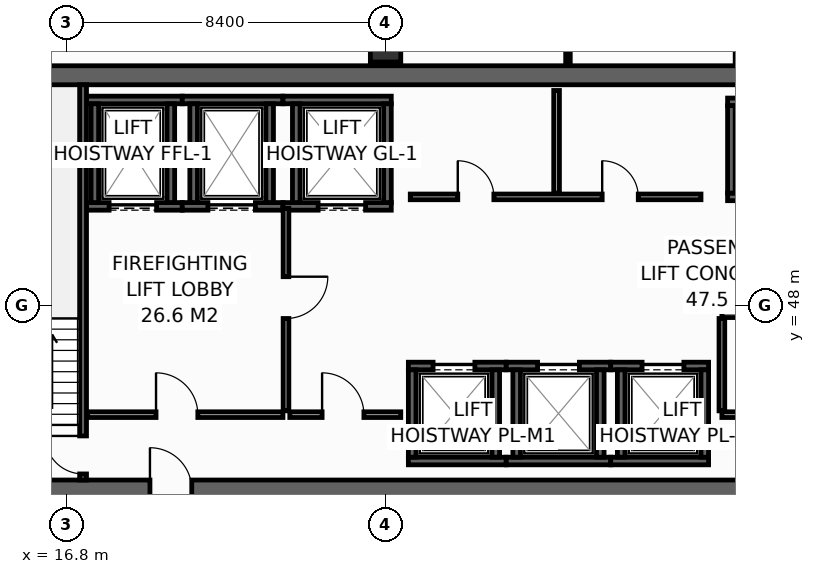
"""IFC4 building model, lengths in metres.
Left out: names, types, materials, properties, quantities, classifications, styles, units other than length and angle.
Written with IfcOpenShell. Run it as: python <this file> out.ifc"""

import sys

from ifc_helpers import new_model, si_unit, direction, frame, frame_2d, origin, origin_2d, place, context, subcontext, project, spatial, rectangle, hollow_rectangle, extrude, element, fill, save


model = new_model("IFC4")
c1 = context("Model", 3, precision=1e-05, world=origin(), true_north=direction((0.0, 1.0)))
c2 = subcontext(c1, "Body", "Model", "MODEL_VIEW")
j1 = project(units=[si_unit("LENGTHUNIT", "METRE"), si_unit("PLANEANGLEUNIT", "RADIAN")], contexts=[c1])
p1 = place(None, origin())
s1 = spatial("IfcSite", under=j1, at=p1, CompositionType="ELEMENT")
p2 = place(p1, origin())
s2 = spatial("IfcBuilding", under=s1, at=p2, CompositionType="ELEMENT")
p3 = place(p2, frame((0.0, 0.0, 182.8)))
s3 = spatial("IfcBuildingStorey", under=s2, at=p3, CompositionType="ELEMENT", Elevation=182.8)
p4 = place(p3, frame((13.6, 43.15, 0.0), z_axis=(0.0, 0.0, 1.0), x_axis=(1.0, 0.0, 0.0)))
e1 = element("IfcWall", 1, at=p4, inside=s3, PredefinedType="SHEAR", context=c2, shape_type="SweptSolid", body=[
    extrude(rectangle(XDim=32.7, YDim=0.5, at=frame_2d((16.35, 0.0))), origin(), (0.0, 0.0, 1.0), 3.55),
])
p5 = place(p4, frame((5.4, 0.0, 0.0)))
e2 = element("IfcOpeningElement", 2, at=p5, cuts=e1, PredefinedType="OPENING", context=c2, shape_type="SweptSolid", body=[
    extrude(rectangle(XDim=1.1, YDim=2.15, at=frame_2d((0.55, 1.075))), frame((0.0, 0.26, 0.0), z_axis=(0.0, -1.0, 0.0), x_axis=(1.0, 0.0, 0.0)), (0.0, 0.0, 1.0), 0.52),
])
p6 = place(p4, frame((25.6, 0.0, 0.0)))
e3 = element("IfcOpeningElement", 3, at=p6, cuts=e1, PredefinedType="OPENING", context=c2, shape_type="SweptSolid", body=[
    extrude(rectangle(XDim=1.1, YDim=2.15, at=frame_2d((0.55, 1.075))), frame((0.0, 0.26, 0.0), z_axis=(0.0, -1.0, 0.0), x_axis=(1.0, 0.0, 0.0)), (0.0, 0.0, 1.0), 0.52),
])
p7 = place(p3, frame((13.6, 54.05, 0.0), z_axis=(0.0, 0.0, 1.0), x_axis=(1.0, 0.0, 0.0)))
e4 = element("IfcWall", 4, at=p7, inside=s3, PredefinedType="SHEAR", context=c2, shape_type="SweptSolid", body=[
    extrude(rectangle(XDim=32.7, YDim=0.5, at=frame_2d((16.35, 0.0))), origin(), (0.0, 0.0, 1.0), 3.55),
])
p8 = place(p3, frame((25.2, 54.8, 0.0), z_axis=(0.0, 0.0, 1.0), x_axis=(1.0, 0.0, 0.0)))
e5 = element("IfcColumn", 5, at=p8, inside=s3, PredefinedType="COLUMN", context=c2, shape_type="SweptSolid", body=[
    extrude(hollow_rectangle(XDim=0.8, YDim=0.8, WallThickness=0.036, at=origin_2d()), origin(), (0.0, 0.0, 1.0), 3.8),
])
p9 = place(p3, frame((17.33, 50.6, 0.0), z_axis=(0.0, 0.0, 1.0), x_axis=(1.0, 0.0, 0.0)))
e6 = element("IfcWall", 6, at=p9, inside=s3, PredefinedType="SHEAR", context=c2, shape_type="SweptSolid", body=[
    extrude(rectangle(XDim=2.52, YDim=0.2, at=frame_2d((1.26, 0.0))), origin(), (0.0, 0.0, 1.0), 3.55),
])
p10 = place(p9, frame((0.595, 0.0, 0.0)))
e7 = element("IfcOpeningElement", 7, at=p10, cuts=e6, PredefinedType="OPENING", context=c2, shape_type="SweptSolid", body=[
    extrude(rectangle(XDim=1.25, YDim=2.3, at=frame_2d((0.625, 1.15))), frame((0.0, 0.11, 0.0), z_axis=(0.0, -1.0, 0.0), x_axis=(1.0, 0.0, 0.0)), (0.0, 0.0, 1.0), 0.22),
])
p11 = place(p3, frame((17.33, 53.4, 0.0), z_axis=(0.0, 0.0, 1.0), x_axis=(1.0, 0.0, 0.0)))
e8 = element("IfcWall", 8, at=p11, inside=s3, PredefinedType="SHEAR", context=c2, shape_type="SweptSolid", body=[
    extrude(rectangle(XDim=2.52, YDim=0.2, at=frame_2d((1.26, 0.0))), origin(), (0.0, 0.0, 1.0), 3.55),
])
for number, where, z_axis, x_axis in (
    (9, (17.55, 50.7, 0.0), (0.0, 0.0, 1.0), (0.0, 1.0, 0.0)),
    (10, (19.55, 50.7, 0.0), (0.0, 0.0, 1.0), (0.0, 1.0, 0.0)),
):
    element("IfcWall", number, at=place(p3, frame(where, z_axis=z_axis, x_axis=x_axis)), inside=s3, PredefinedType="SHEAR", context=c2, shape_type="SweptSolid", body=[
        extrude(rectangle(XDim=2.6, YDim=0.2, at=frame_2d((1.3, 0.0))), origin(), (0.0, 0.0, 1.0), 3.55),
    ])
p12 = place(p3, frame((19.85, 50.6, 0.0), z_axis=(0.0, 0.0, 1.0), x_axis=(1.0, 0.0, 0.0)))
e11 = element("IfcWall", 11, at=p12, inside=s3, PredefinedType="SHEAR", context=c2, shape_type="SweptSolid", body=[
    extrude(rectangle(XDim=2.65, YDim=0.2, at=frame_2d((1.325, 0.0))), origin(), (0.0, 0.0, 1.0), 3.55),
])
p13 = place(p12, frame((0.675, 0.0, 0.0)))
e12 = element("IfcOpeningElement", 12, at=p13, cuts=e11, PredefinedType="OPENING", context=c2, shape_type="SweptSolid", body=[
    extrude(rectangle(XDim=1.25, YDim=2.3, at=frame_2d((0.625, 1.15))), frame((0.0, 0.11, 0.0), z_axis=(0.0, -1.0, 0.0), x_axis=(1.0, 0.0, 0.0)), (0.0, 0.0, 1.0), 0.22),
])
p14 = place(p3, frame((19.85, 53.4, 0.0), z_axis=(0.0, 0.0, 1.0), x_axis=(1.0, 0.0, 0.0)))
e13 = element("IfcWall", 13, at=p14, inside=s3, PredefinedType="SHEAR", context=c2, shape_type="SweptSolid", body=[
    extrude(rectangle(XDim=2.65, YDim=0.2, at=frame_2d((1.325, 0.0))), origin(), (0.0, 0.0, 1.0), 3.55),
])
for number, where, z_axis, x_axis in (
    (14, (20.15, 50.7, 0.0), (0.0, 0.0, 1.0), (0.0, 1.0, 0.0)),
    (15, (22.15, 50.7, 0.0), (0.0, 0.0, 1.0), (0.0, 1.0, 0.0)),
):
    element("IfcWall", number, at=place(p3, frame(where, z_axis=z_axis, x_axis=x_axis)), inside=s3, PredefinedType="SHEAR", context=c2, shape_type="SweptSolid", body=[
        extrude(rectangle(XDim=2.6, YDim=0.2, at=frame_2d((1.3, 0.0))), origin(), (0.0, 0.0, 1.0), 3.55),
    ])
p15 = place(p3, frame((22.5, 50.6, 0.0), z_axis=(0.0, 0.0, 1.0), x_axis=(1.0, 0.0, 0.0)))
e16 = element("IfcWall", 16, at=p15, inside=s3, PredefinedType="SHEAR", context=c2, shape_type="SweptSolid", body=[
    extrude(rectangle(XDim=2.85, YDim=0.2, at=frame_2d((1.425, 0.0))), origin(), (0.0, 0.0, 1.0), 3.55),
])
p16 = place(p15, frame((0.925, 0.0, 0.0)))
e17 = element("IfcOpeningElement", 17, at=p16, cuts=e16, PredefinedType="OPENING", context=c2, shape_type="SweptSolid", body=[
    extrude(rectangle(XDim=1.25, YDim=2.3, at=frame_2d((0.625, 1.15))), frame((0.0, 0.11, 0.0), z_axis=(0.0, -1.0, 0.0), x_axis=(1.0, 0.0, 0.0)), (0.0, 0.0, 1.0), 0.22),
])
p17 = place(p3, frame((22.5, 53.4, 0.0), z_axis=(0.0, 0.0, 1.0), x_axis=(1.0, 0.0, 0.0)))
e18 = element("IfcWall", 18, at=p17, inside=s3, PredefinedType="SHEAR", context=c2, shape_type="SweptSolid", body=[
    extrude(rectangle(XDim=2.85, YDim=0.2, at=frame_2d((1.425, 0.0))), origin(), (0.0, 0.0, 1.0), 3.55),
])
for number, where, z_axis, x_axis in (
    (19, (22.85, 50.7, 0.0), (0.0, 0.0, 1.0), (0.0, 1.0, 0.0)),
    (20, (25.25, 50.7, 0.0), (0.0, 0.0, 1.0), (0.0, 1.0, 0.0)),
):
    element("IfcWall", number, at=place(p3, frame(where, z_axis=z_axis, x_axis=x_axis)), inside=s3, PredefinedType="SHEAR", context=c2, shape_type="SweptSolid", body=[
        extrude(rectangle(XDim=2.6, YDim=0.2, at=frame_2d((1.3, 0.0))), origin(), (0.0, 0.0, 1.0), 3.55),
    ])
p18 = place(p3, frame((25.8, 43.9, 0.0), z_axis=(0.0, 0.0, 1.0), x_axis=(1.0, 0.0, 0.0)))
e21 = element("IfcWall", 21, at=p18, inside=s3, PredefinedType="SHEAR", context=c2, shape_type="SweptSolid", body=[
    extrude(rectangle(XDim=2.575, YDim=0.2, at=frame_2d((1.288, 0.0))), origin(), (0.0, 0.0, 1.0), 3.55),
])
p19 = place(p3, frame((25.8, 46.4, 0.0), z_axis=(0.0, 0.0, 1.0), x_axis=(1.0, 0.0, 0.0)))
e22 = element("IfcWall", 22, at=p19, inside=s3, PredefinedType="SHEAR", context=c2, shape_type="SweptSolid", body=[
    extrude(rectangle(XDim=2.575, YDim=0.2, at=frame_2d((1.288, 0.0))), origin(), (0.0, 0.0, 1.0), 3.55),
])
p20 = place(p19, frame((0.65, 0.0, 0.0)))
e23 = element("IfcOpeningElement", 23, at=p20, cuts=e22, PredefinedType="OPENING", context=c2, shape_type="SweptSolid", body=[
    extrude(rectangle(XDim=1.1, YDim=2.2, at=frame_2d((0.55, 1.1))), frame((0.0, 0.11, 0.0), z_axis=(0.0, -1.0, 0.0), x_axis=(1.0, 0.0, 0.0)), (0.0, 0.0, 1.0), 0.22),
])
for number, where, z_axis, x_axis in (
    (24, (25.9, 44.0, 0.0), (0.0, 0.0, 1.0), (0.0, 1.0, 0.0)),
    (25, (28.1, 44.0, 0.0), (0.0, 0.0, 1.0), (0.0, 1.0, 0.0)),
):
    element("IfcWall", number, at=place(p3, frame(where, z_axis=z_axis, x_axis=x_axis)), inside=s3, PredefinedType="SHEAR", context=c2, shape_type="SweptSolid", body=[
        extrude(rectangle(XDim=2.3, YDim=0.2, at=frame_2d((1.15, 0.0))), origin(), (0.0, 0.0, 1.0), 3.55),
    ])
p21 = place(p3, frame((28.375, 43.9, 0.0), z_axis=(0.0, 0.0, 1.0), x_axis=(1.0, 0.0, 0.0)))
e26 = element("IfcWall", 26, at=p21, inside=s3, PredefinedType="SHEAR", context=c2, shape_type="SweptSolid", body=[
    extrude(rectangle(XDim=2.75, YDim=0.2, at=frame_2d((1.375, 0.0))), origin(), (0.0, 0.0, 1.0), 3.55),
])
p22 = place(p3, frame((28.375, 46.4, 0.0), z_axis=(0.0, 0.0, 1.0), x_axis=(1.0, 0.0, 0.0)))
e27 = element("IfcWall", 27, at=p22, inside=s3, PredefinedType="SHEAR", context=c2, shape_type="SweptSolid", body=[
    extrude(rectangle(XDim=2.75, YDim=0.2, at=frame_2d((1.375, 0.0))), origin(), (0.0, 0.0, 1.0), 3.55),
])
p23 = place(p22, frame((0.825, 0.0, 0.0)))
e28 = element("IfcOpeningElement", 28, at=p23, cuts=e27, PredefinedType="OPENING", context=c2, shape_type="SweptSolid", body=[
    extrude(rectangle(XDim=1.1, YDim=2.2, at=frame_2d((0.55, 1.1))), frame((0.0, 0.11, 0.0), z_axis=(0.0, -1.0, 0.0), x_axis=(1.0, 0.0, 0.0)), (0.0, 0.0, 1.0), 0.22),
])
for number, where, z_axis, x_axis in (
    (29, (28.65, 44.0, 0.0), (0.0, 0.0, 1.0), (0.0, 1.0, 0.0)),
    (30, (30.85, 44.0, 0.0), (0.0, 0.0, 1.0), (0.0, 1.0, 0.0)),
):
    element("IfcWall", number, at=place(p3, frame(where, z_axis=z_axis, x_axis=x_axis)), inside=s3, PredefinedType="SHEAR", context=c2, shape_type="SweptSolid", body=[
        extrude(rectangle(XDim=2.3, YDim=0.2, at=frame_2d((1.15, 0.0))), origin(), (0.0, 0.0, 1.0), 3.55),
    ])
p24 = place(p3, frame((31.125, 43.9, 0.0), z_axis=(0.0, 0.0, 1.0), x_axis=(1.0, 0.0, 0.0)))
e31 = element("IfcWall", 31, at=p24, inside=s3, PredefinedType="SHEAR", context=c2, shape_type="SweptSolid", body=[
    extrude(rectangle(XDim=2.575, YDim=0.2, at=frame_2d((1.288, 0.0))), origin(), (0.0, 0.0, 1.0), 3.55),
])
p25 = place(p3, frame((31.125, 46.4, 0.0), z_axis=(0.0, 0.0, 1.0), x_axis=(1.0, 0.0, 0.0)))
e32 = element("IfcWall", 32, at=p25, inside=s3, PredefinedType="SHEAR", context=c2, shape_type="SweptSolid", body=[
    extrude(rectangle(XDim=2.575, YDim=0.2, at=frame_2d((1.288, 0.0))), origin(), (0.0, 0.0, 1.0), 3.55),
])
p26 = place(p25, frame((0.825, 0.0, 0.0)))
e33 = element("IfcOpeningElement", 33, at=p26, cuts=e32, PredefinedType="OPENING", context=c2, shape_type="SweptSolid", body=[
    extrude(rectangle(XDim=1.1, YDim=2.2, at=frame_2d((0.55, 1.1))), frame((0.0, 0.11, 0.0), z_axis=(0.0, -1.0, 0.0), x_axis=(1.0, 0.0, 0.0)), (0.0, 0.0, 1.0), 0.22),
])
for number, where, z_axis, x_axis in (
    (34, (31.4, 44.0, 0.0), (0.0, 0.0, 1.0), (0.0, 1.0, 0.0)),
    (35, (33.6, 44.0, 0.0), (0.0, 0.0, 1.0), (0.0, 1.0, 0.0)),
):
    element("IfcWall", number, at=place(p3, frame(where, z_axis=z_axis, x_axis=x_axis)), inside=s3, PredefinedType="SHEAR", context=c2, shape_type="SweptSolid", body=[
        extrude(rectangle(XDim=2.3, YDim=0.2, at=frame_2d((1.15, 0.0))), origin(), (0.0, 0.0, 1.0), 3.55),
    ])
for number, where, z_axis, x_axis in (
    (36, (34.2, 50.85, 0.0), (0.0, 0.0, 1.0), (1.0, 0.0, 0.0)),
    (37, (34.2, 53.35, 0.0), (0.0, 0.0, 1.0), (1.0, 0.0, 0.0)),
):
    element("IfcWall", number, at=place(p3, frame(where, z_axis=z_axis, x_axis=x_axis)), inside=s3, PredefinedType="SHEAR", context=c2, shape_type="SweptSolid", body=[
        extrude(rectangle(XDim=2.575, YDim=0.2, at=frame_2d((1.288, 0.0))), origin(), (0.0, 0.0, 1.0), 3.55),
    ])
p27 = place(p3, frame((34.3, 50.95, 0.0), z_axis=(0.0, 0.0, 1.0), x_axis=(0.0, 1.0, 0.0)))
e38 = element("IfcWall", 38, at=p27, inside=s3, PredefinedType="SHEAR", context=c2, shape_type="SweptSolid", body=[
    extrude(rectangle(XDim=2.3, YDim=0.2, at=frame_2d((1.15, 0.0))), origin(), (0.0, 0.0, 1.0), 3.55),
])
p28 = place(p3, frame((17.24, 43.4, 0.0), z_axis=(0.0, 0.0, 1.0), x_axis=(0.0, 1.0, 0.0)))
e39 = element("IfcWall", 39, at=p28, inside=s3, PredefinedType="SHEAR", context=c2, shape_type="SweptSolid", body=[
    extrude(rectangle(XDim=10.4, YDim=0.18, at=frame_2d((5.2, 0.0))), origin(), (0.0, 0.0, 1.0), 3.55),
])
p29 = place(p28, frame((0.16, 0.0, 0.0)))
e40 = element("IfcOpeningElement", 40, at=p29, cuts=e39, PredefinedType="OPENING", context=c2, shape_type="SweptSolid", body=[
    extrude(rectangle(XDim=1.0, YDim=2.15, at=frame_2d((0.5, 1.075))), frame((0.0, 0.1, 0.0), z_axis=(0.0, -1.0, 0.0), x_axis=(1.0, 0.0, 0.0)), (0.0, 0.0, 1.0), 0.2),
])
p30 = place(p3, frame((17.36, 45.12, 0.0), z_axis=(0.0, 0.0, 1.0), x_axis=(1.0, 0.0, 0.0)))
e41 = element("IfcWall", 41, at=p30, inside=s3, PredefinedType="PARTITIONING", context=c2, shape_type="SweptSolid", body=[
    extrude(rectangle(XDim=5.14, YDim=0.15, at=frame_2d((2.57, 0.0))), origin(), (0.0, 0.0, 1.0), 3.55),
])
p31 = place(p30, frame((1.8, 0.0, 0.0)))
e42 = element("IfcOpeningElement", 42, at=p31, cuts=e41, PredefinedType="OPENING", context=c2, shape_type="SweptSolid", body=[
    extrude(rectangle(XDim=1.1, YDim=2.15, at=frame_2d((0.55, 1.075))), frame((0.0, 0.085, 0.0), z_axis=(0.0, -1.0, 0.0), x_axis=(1.0, 0.0, 0.0)), (0.0, 0.0, 1.0), 0.17),
])
p32 = place(p3, frame((22.58, 50.55, 0.0), z_axis=(0.0, 0.0, 1.0), x_axis=(0.0, -1.0, 0.0)))
e43 = element("IfcWall", 43, at=p32, inside=s3, PredefinedType="PARTITIONING", context=c2, shape_type="SweptSolid", body=[
    extrude(rectangle(XDim=5.33, YDim=0.15, at=frame_2d((2.665, 0.0))), origin(), (0.0, 0.0, 1.0), 3.55),
])
p33 = place(p32, frame((1.8, 0.0, 0.0)))
e44 = element("IfcOpeningElement", 44, at=p33, cuts=e43, PredefinedType="OPENING", context=c2, shape_type="SweptSolid", body=[
    extrude(rectangle(XDim=1.1, YDim=2.15, at=frame_2d((0.55, 1.075))), frame((0.0, 0.085, 0.0), z_axis=(0.0, -1.0, 0.0), x_axis=(1.0, 0.0, 0.0)), (0.0, 0.0, 1.0), 0.17),
])
p34 = place(p3, frame((22.68, 45.12, 0.0), z_axis=(0.0, 0.0, 1.0), x_axis=(1.0, 0.0, 0.0)))
e45 = element("IfcWall", 45, at=p34, inside=s3, PredefinedType="PARTITIONING", context=c2, shape_type="SweptSolid", body=[
    extrude(rectangle(XDim=2.92, YDim=0.15, at=frame_2d((1.46, 0.0))), origin(), (0.0, 0.0, 1.0), 3.55),
])
p35 = place(p34, frame((0.85, 0.0, 0.0)))
e46 = element("IfcOpeningElement", 46, at=p35, cuts=e45, PredefinedType="OPENING", context=c2, shape_type="SweptSolid", body=[
    extrude(rectangle(XDim=1.1, YDim=2.15, at=frame_2d((0.55, 1.075))), frame((0.0, 0.085, 0.0), z_axis=(0.0, -1.0, 0.0), x_axis=(1.0, 0.0, 0.0)), (0.0, 0.0, 1.0), 0.17),
])
p36 = place(p3, frame((34.05, 45.12, 0.0), z_axis=(0.0, 0.0, 1.0), x_axis=(1.0, 0.0, 0.0)))
e47 = element("IfcWall", 47, at=p36, inside=s3, PredefinedType="PARTITIONING", context=c2, shape_type="SweptSolid", body=[
    extrude(rectangle(XDim=8.45, YDim=0.15, at=frame_2d((4.225, 0.0))), origin(), (0.0, 0.0, 1.0), 3.55),
])
p37 = place(p36, frame((3.6, 0.0, 0.0)))
e48 = element("IfcOpeningElement", 48, at=p37, cuts=e47, PredefinedType="OPENING", context=c2, shape_type="SweptSolid", body=[
    extrude(rectangle(XDim=0.95, YDim=2.15, at=frame_2d((0.475, 1.075))), frame((0.0, 0.085, 0.0), z_axis=(0.0, -1.0, 0.0), x_axis=(1.0, 0.0, 0.0)), (0.0, 0.0, 1.0), 0.17),
])
p38 = place(p3, frame((34.05, 47.75, 0.0), z_axis=(0.0, 0.0, 1.0), x_axis=(1.0, 0.0, 0.0)))
e49 = element("IfcWall", 49, at=p38, inside=s3, PredefinedType="PARTITIONING", context=c2, shape_type="SweptSolid", body=[
    extrude(rectangle(XDim=8.45, YDim=0.15, at=frame_2d((4.225, 0.0))), origin(), (0.0, 0.0, 1.0), 3.55),
])
p39 = place(p3, frame((34.05, 45.22, 0.0), z_axis=(0.0, 0.0, 1.0), x_axis=(0.0, 1.0, 0.0)))
e50 = element("IfcWall", 50, at=p39, inside=s3, PredefinedType="PARTITIONING", context=c2, shape_type="SweptSolid", body=[
    extrude(rectangle(XDim=2.43, YDim=0.15, at=frame_2d((1.215, 0.0))), origin(), (0.0, 0.0, 1.0), 3.55),
])
p40 = place(p3, frame((25.85, 50.85, 0.0), z_axis=(0.0, 0.0, 1.0), x_axis=(1.0, 0.0, 0.0)))
e51 = element("IfcWall", 51, at=p40, inside=s3, PredefinedType="PARTITIONING", context=c2, shape_type="SweptSolid", body=[
    extrude(rectangle(XDim=7.65, YDim=0.15, at=frame_2d((3.825, 0.0))), origin(), (0.0, 0.0, 1.0), 3.55),
])
p41 = place(p40, frame((1.25, 0.0, 0.0)))
e52 = element("IfcOpeningElement", 52, at=p41, cuts=e51, PredefinedType="OPENING", context=c2, shape_type="SweptSolid", body=[
    extrude(rectangle(XDim=0.95, YDim=2.15, at=frame_2d((0.475, 1.075))), frame((0.0, 0.085, 0.0), z_axis=(0.0, -1.0, 0.0), x_axis=(1.0, 0.0, 0.0)), (0.0, 0.0, 1.0), 0.17),
])
p42 = place(p40, frame((5.05, 0.0, 0.0)))
e53 = element("IfcOpeningElement", 53, at=p42, cuts=e51, PredefinedType="OPENING", context=c2, shape_type="SweptSolid", body=[
    extrude(rectangle(XDim=0.95, YDim=2.15, at=frame_2d((0.475, 1.075))), frame((0.0, 0.085, 0.0), z_axis=(0.0, -1.0, 0.0), x_axis=(1.0, 0.0, 0.0)), (0.0, 0.0, 1.0), 0.17),
])
p43 = place(p3, frame((29.7, 50.95, 0.0), z_axis=(0.0, 0.0, 1.0), x_axis=(0.0, 1.0, 0.0)))
e54 = element("IfcWall", 54, at=p43, inside=s3, PredefinedType="PARTITIONING", context=c2, shape_type="SweptSolid", body=[
    extrude(rectangle(XDim=2.7, YDim=0.15, at=frame_2d((1.35, 0.0))), origin(), (0.0, 0.0, 1.0), 3.55),
])
p44 = place(p3, frame((30.0, 54.32, 0.0), z_axis=(0.0, 0.0, 1.0), x_axis=(0.0, 1.0, 0.0)))
e55 = element("IfcWall", 55, at=p44, inside=s3, PredefinedType="PARTITIONING", context=c2, shape_type="SweptSolid", body=[
    extrude(rectangle(XDim=1.675, YDim=0.12, at=frame_2d((0.837, 0.0))), origin(), (0.0, 0.0, 1.0), 2.935),
])
p45 = place(p10, origin())
e56 = element("IfcDoor", 56, at=p45, inside=s3, OperationType="SLIDING_TO_LEFT", PredefinedType="DOOR", context=c2, shape_type="SweptSolid", body=[
    extrude(rectangle(XDim=1.25, YDim=2.3, at=frame_2d((0.625, 1.15))), frame((0.0, 0.025, 0.0), z_axis=(0.0, -1.0, 0.0), x_axis=(1.0, 0.0, 0.0)), (0.0, 0.0, 1.0), 0.05),
])
fill(e7, e56)
p46 = place(p13, origin())
e57 = element("IfcDoor", 57, at=p46, inside=s3, OperationType="SLIDING_TO_LEFT", PredefinedType="DOOR", context=c2, shape_type="SweptSolid", body=[
    extrude(rectangle(XDim=1.25, YDim=2.3, at=frame_2d((0.625, 1.15))), frame((0.0, 0.025, 0.0), z_axis=(0.0, -1.0, 0.0), x_axis=(1.0, 0.0, 0.0)), (0.0, 0.0, 1.0), 0.05),
])
fill(e12, e57)
p47 = place(p16, origin())
e58 = element("IfcDoor", 58, at=p47, inside=s3, OperationType="SLIDING_TO_LEFT", PredefinedType="DOOR", context=c2, shape_type="SweptSolid", body=[
    extrude(rectangle(XDim=1.25, YDim=2.3, at=frame_2d((0.625, 1.15))), frame((0.0, 0.025, 0.0), z_axis=(0.0, -1.0, 0.0), x_axis=(1.0, 0.0, 0.0)), (0.0, 0.0, 1.0), 0.05),
])
fill(e17, e58)
p48 = place(p20, origin())
e59 = element("IfcDoor", 59, at=p48, inside=s3, OperationType="SLIDING_TO_LEFT", PredefinedType="DOOR", context=c2, shape_type="SweptSolid", body=[
    extrude(rectangle(XDim=1.1, YDim=2.2, at=frame_2d((0.55, 1.1))), frame((0.0, 0.025, 0.0), z_axis=(0.0, -1.0, 0.0), x_axis=(1.0, 0.0, 0.0)), (0.0, 0.0, 1.0), 0.05),
])
fill(e23, e59)
p49 = place(p23, origin())
e60 = element("IfcDoor", 60, at=p49, inside=s3, OperationType="SLIDING_TO_LEFT", PredefinedType="DOOR", context=c2, shape_type="SweptSolid", body=[
    extrude(rectangle(XDim=1.1, YDim=2.2, at=frame_2d((0.55, 1.1))), frame((0.0, 0.025, 0.0), z_axis=(0.0, -1.0, 0.0), x_axis=(1.0, 0.0, 0.0)), (0.0, 0.0, 1.0), 0.05),
])
fill(e28, e60)
p50 = place(p26, origin())
e61 = element("IfcDoor", 61, at=p50, inside=s3, OperationType="SLIDING_TO_LEFT", PredefinedType="DOOR", context=c2, shape_type="SweptSolid", body=[
    extrude(rectangle(XDim=1.1, YDim=2.2, at=frame_2d((0.55, 1.1))), frame((0.0, 0.025, 0.0), z_axis=(0.0, -1.0, 0.0), x_axis=(1.0, 0.0, 0.0)), (0.0, 0.0, 1.0), 0.05),
])
fill(e33, e61)
p51 = place(p29, origin())
e62 = element("IfcDoor", 62, at=p51, inside=s3, OperationType="SINGLE_SWING_RIGHT", PredefinedType="DOOR", context=c2, shape_type="SweptSolid", body=[
    extrude(rectangle(XDim=1.0, YDim=2.15, at=frame_2d((0.5, 1.075))), frame((0.0, 0.025, 0.0), z_axis=(0.0, -1.0, 0.0), x_axis=(1.0, 0.0, 0.0)), (0.0, 0.0, 1.0), 0.05),
])
fill(e40, e62)
p52 = place(p31, origin())
e63 = element("IfcDoor", 63, at=p52, inside=s3, OperationType="SINGLE_SWING_LEFT", PredefinedType="DOOR", context=c2, shape_type="SweptSolid", body=[
    extrude(rectangle(XDim=1.1, YDim=2.15, at=frame_2d((0.55, 1.075))), frame((0.0, 0.025, 0.0), z_axis=(0.0, -1.0, 0.0), x_axis=(1.0, 0.0, 0.0)), (0.0, 0.0, 1.0), 0.05),
])
fill(e42, e63)
p53 = place(p33, origin())
e64 = element("IfcDoor", 64, at=p53, inside=s3, OperationType="SINGLE_SWING_LEFT", PredefinedType="DOOR", context=c2, shape_type="SweptSolid", body=[
    extrude(rectangle(XDim=1.1, YDim=2.15, at=frame_2d((0.55, 1.075))), frame((0.0, 0.025, 0.0), z_axis=(0.0, -1.0, 0.0), x_axis=(1.0, 0.0, 0.0)), (0.0, 0.0, 1.0), 0.05),
])
fill(e44, e64)
p54 = place(p35, origin())
e65 = element("IfcDoor", 65, at=p54, inside=s3, OperationType="SINGLE_SWING_LEFT", PredefinedType="DOOR", context=c2, shape_type="SweptSolid", body=[
    extrude(rectangle(XDim=1.1, YDim=2.15, at=frame_2d((0.55, 1.075))), frame((0.0, 0.025, 0.0), z_axis=(0.0, -1.0, 0.0), x_axis=(1.0, 0.0, 0.0)), (0.0, 0.0, 1.0), 0.05),
])
fill(e46, e65)
p55 = place(p5, origin())
e66 = element("IfcDoor", 66, at=p55, inside=s3, OperationType="SINGLE_SWING_LEFT", PredefinedType="DOOR", context=c2, shape_type="SweptSolid", body=[
    extrude(rectangle(XDim=1.1, YDim=2.15, at=frame_2d((0.55, 1.075))), frame((0.0, 0.025, 0.0), z_axis=(0.0, -1.0, 0.0), x_axis=(1.0, 0.0, 0.0)), (0.0, 0.0, 1.0), 0.05),
])
fill(e2, e66)
p56 = place(p41, origin())
e67 = element("IfcDoor", 67, at=p56, inside=s3, OperationType="SINGLE_SWING_LEFT", PredefinedType="DOOR", context=c2, shape_type="SweptSolid", body=[
    extrude(rectangle(XDim=0.95, YDim=2.15, at=frame_2d((0.475, 1.075))), frame((0.0, 0.025, 0.0), z_axis=(0.0, -1.0, 0.0), x_axis=(1.0, 0.0, 0.0)), (0.0, 0.0, 1.0), 0.05),
])
fill(e52, e67)
p57 = place(p42, origin())
e68 = element("IfcDoor", 68, at=p57, inside=s3, OperationType="SINGLE_SWING_LEFT", PredefinedType="DOOR", context=c2, shape_type="SweptSolid", body=[
    extrude(rectangle(XDim=0.95, YDim=2.15, at=frame_2d((0.475, 1.075))), frame((0.0, 0.025, 0.0), z_axis=(0.0, -1.0, 0.0), x_axis=(1.0, 0.0, 0.0)), (0.0, 0.0, 1.0), 0.05),
])
fill(e53, e68)
save(model, sys.argv[1])
